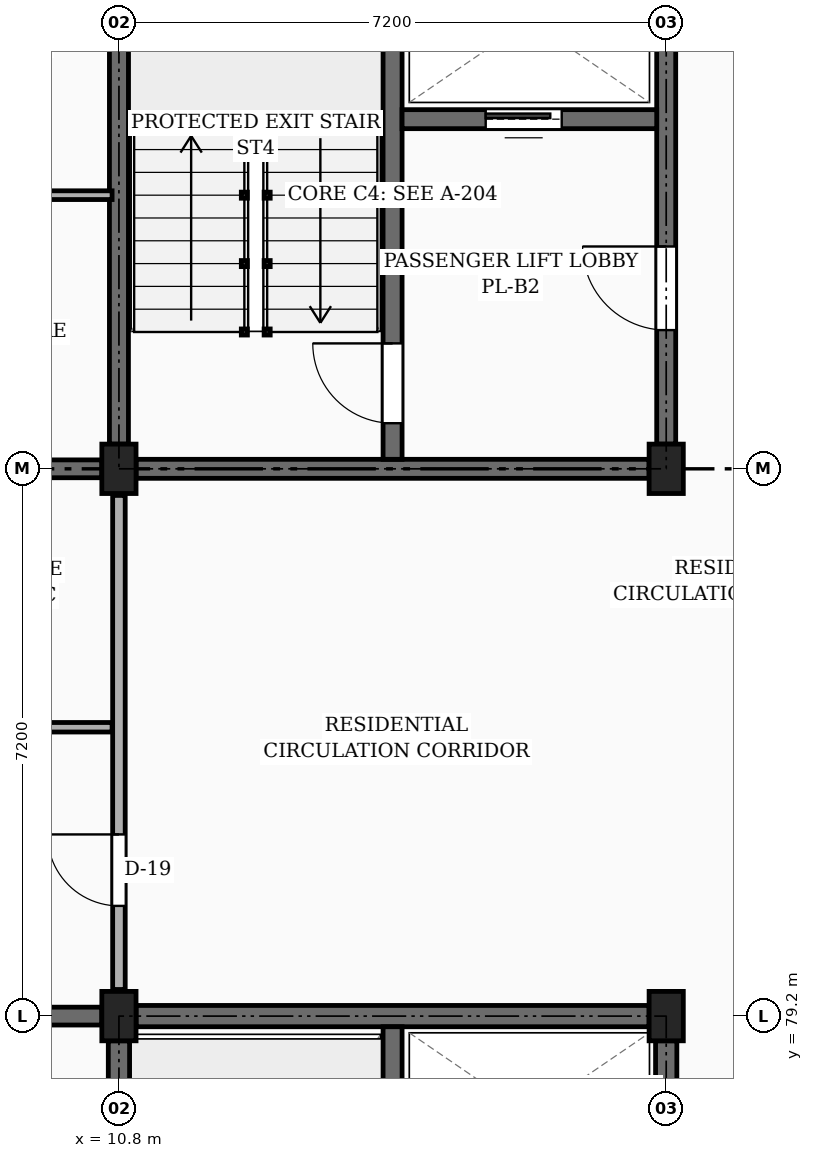
"""IFC4 building model, lengths in metres.
Left out: names, types, materials, properties, quantities, classifications, styles, units other than length and angle.
Written with IfcOpenShell. Run it as: python <this file> out.ifc"""

import sys

from ifc_helpers import new_model, si_unit, direction, frame, frame_2d, origin, origin_2d, place, context, subcontext, project, spatial, rectangle, extrude, element, fill, save


model = new_model("IFC4")
c1 = context("Model", 3, precision=1e-05, world=origin(), true_north=direction((0.0, 1.0)))
c2 = subcontext(c1, "Body", "Model", "MODEL_VIEW")
j1 = project(units=[si_unit("LENGTHUNIT", "METRE"), si_unit("PLANEANGLEUNIT", "RADIAN")], contexts=[c1])
p1 = place(None, origin())
s1 = spatial("IfcSite", under=j1, at=p1, CompositionType="ELEMENT")
p2 = place(p1, origin())
s2 = spatial("IfcBuilding", under=s1, at=p2, CompositionType="ELEMENT")
p3 = place(p2, frame((0.0, 0.0, 17.1)))
s3 = spatial("IfcBuildingStorey", under=s2, at=p3, CompositionType="ELEMENT", Elevation=17.1)
for number, where, z_axis, x_axis in (
    (1, (10.8, 79.2, 0.0), (0.0, 0.0, 1.0), (1.0, 0.0, 0.0)),
    (2, (10.8, 86.4, 0.0), (0.0, 0.0, 1.0), (1.0, 0.0, 0.0)),
    (3, (18.0, 79.2, 0.0), (0.0, 0.0, 1.0), (1.0, 0.0, 0.0)),
    (4, (18.0, 86.4, 0.0), (0.0, 0.0, 1.0), (1.0, 0.0, 0.0)),
):
    element("IfcColumn", number, at=place(p3, frame(where, z_axis=z_axis, x_axis=x_axis)), inside=s3, PredefinedType="COLUMN", context=c2, shape_type="SweptSolid", body=[
        extrude(rectangle(XDim=0.45, YDim=0.65, at=origin_2d()), origin(), (0.0, 0.0, 1.0), 3.15),
    ])
p4 = place(p3, frame((3.875, 79.2, 0.0), z_axis=(0.0, 0.0, 1.0), x_axis=(1.0, 0.0, 0.0)))
e5 = element("IfcWall", 5, at=p4, inside=s3, PredefinedType="SOLIDWALL", context=c2, shape_type="SweptSolid", body=[
    extrude(rectangle(XDim=6.7, YDim=0.235, at=frame_2d((3.35, 0.0))), origin(), (0.0, 0.0, 1.0), 2.21),
])
p5 = place(p3, frame((3.875, 86.4, 0.0), z_axis=(0.0, 0.0, 1.0), x_axis=(1.0, 0.0, 0.0)))
e6 = element("IfcWall", 6, at=p5, inside=s3, PredefinedType="SOLIDWALL", context=c2, shape_type="SweptSolid", body=[
    extrude(rectangle(XDim=6.7, YDim=0.235, at=frame_2d((3.35, 0.0))), origin(), (0.0, 0.0, 1.0), 2.21),
])
p6 = place(p5, frame((1.35, 0.0, 0.0)))
e7 = element("IfcOpeningElement", 7, at=p6, cuts=e6, PredefinedType="OPENING", context=c2, shape_type="SweptSolid", body=[
    extrude(rectangle(XDim=0.98, YDim=2.12, at=frame_2d((0.49, 1.06))), frame((0.0, 0.127, 0.0), z_axis=(0.0, -1.0, 0.0), x_axis=(1.0, 0.0, 0.0)), (0.0, 0.0, 1.0), 0.255),
])
p7 = place(p3, frame((10.8, 72.325, 0.0), z_axis=(0.0, 0.0, 1.0), x_axis=(0.0, 1.0, 0.0)))
e8 = element("IfcWall", 8, at=p7, inside=s3, PredefinedType="SHEAR", context=c2, shape_type="SweptSolid", body=[
    extrude(rectangle(XDim=6.55, YDim=0.28, at=frame_2d((3.275, 0.0))), origin(), (0.0, 0.0, 1.0), 2.91),
])
p8 = place(p3, frame((11.025, 79.2, 0.0), z_axis=(0.0, 0.0, 1.0), x_axis=(1.0, 0.0, 0.0)))
e9 = element("IfcWall", 9, at=p8, inside=s3, PredefinedType="SHEAR", context=c2, shape_type="SweptSolid", body=[
    extrude(rectangle(XDim=6.75, YDim=0.28, at=frame_2d((3.375, 0.0))), origin(), (0.0, 0.0, 1.0), 2.91),
])
p9 = place(p3, frame((18.0, 72.325, 0.0), z_axis=(0.0, 0.0, 1.0), x_axis=(0.0, 1.0, 0.0)))
e10 = element("IfcWall", 10, at=p9, inside=s3, PredefinedType="SHEAR", context=c2, shape_type="SweptSolid", body=[
    extrude(rectangle(XDim=6.55, YDim=0.28, at=frame_2d((3.275, 0.0))), origin(), (0.0, 0.0, 1.0), 2.91),
])
p10 = place(p9, frame((1.5, 0.0, 0.0)))
e11 = element("IfcOpeningElement", 11, at=p10, cuts=e10, PredefinedType="OPENING", context=c2, shape_type="SweptSolid", body=[
    extrude(rectangle(XDim=1.1, YDim=2.15, at=frame_2d((0.55, 1.075))), frame((0.0, 0.15, 0.0), z_axis=(0.0, -1.0, 0.0), x_axis=(1.0, 0.0, 0.0)), (0.0, 0.0, 1.0), 0.3),
])
p11 = place(p3, frame((14.4, 72.14, 0.0), z_axis=(0.0, 0.0, 1.0), x_axis=(0.0, 1.0, 0.0)))
e12 = element("IfcWall", 12, at=p11, inside=s3, PredefinedType="SHEAR", context=c2, shape_type="SweptSolid", body=[
    extrude(rectangle(XDim=6.92, YDim=0.25, at=frame_2d((3.46, 0.0))), origin(), (0.0, 0.0, 1.0), 2.91),
])
p12 = place(p11, frame((0.46, 0.0, 0.0)))
e13 = element("IfcOpeningElement", 13, at=p12, cuts=e12, PredefinedType="OPENING", context=c2, shape_type="SweptSolid", body=[
    extrude(rectangle(XDim=1.05, YDim=2.15, at=frame_2d((0.525, 1.075))), frame((0.0, 0.135, 0.0), z_axis=(0.0, -1.0, 0.0), x_axis=(1.0, 0.0, 0.0)), (0.0, 0.0, 1.0), 0.27),
])
p13 = place(p3, frame((10.8, 86.725, 0.0), z_axis=(0.0, 0.0, 1.0), x_axis=(0.0, 1.0, 0.0)))
e14 = element("IfcWall", 14, at=p13, inside=s3, PredefinedType="SHEAR", context=c2, shape_type="SweptSolid", body=[
    extrude(rectangle(XDim=6.55, YDim=0.25, at=frame_2d((3.275, 0.0))), origin(), (0.0, 0.0, 1.0), 2.91),
])
p14 = place(p3, frame((18.0, 86.725, 0.0), z_axis=(0.0, 0.0, 1.0), x_axis=(0.0, 1.0, 0.0)))
e15 = element("IfcWall", 15, at=p14, inside=s3, PredefinedType="SHEAR", context=c2, shape_type="SweptSolid", body=[
    extrude(rectangle(XDim=6.55, YDim=0.25, at=frame_2d((3.275, 0.0))), origin(), (0.0, 0.0, 1.0), 2.91),
])
p15 = place(p14, frame((1.5, 0.0, 0.0)))
e16 = element("IfcOpeningElement", 16, at=p15, cuts=e15, PredefinedType="OPENING", context=c2, shape_type="SweptSolid", body=[
    extrude(rectangle(XDim=1.1, YDim=2.15, at=frame_2d((0.55, 1.075))), frame((0.0, 0.135, 0.0), z_axis=(0.0, -1.0, 0.0), x_axis=(1.0, 0.0, 0.0)), (0.0, 0.0, 1.0), 0.27),
])
p16 = place(p3, frame((11.025, 86.4, 0.0), z_axis=(0.0, 0.0, 1.0), x_axis=(1.0, 0.0, 0.0)))
e17 = element("IfcWall", 17, at=p16, inside=s3, PredefinedType="SHEAR", context=c2, shape_type="SweptSolid", body=[
    extrude(rectangle(XDim=6.75, YDim=0.25, at=frame_2d((3.375, 0.0))), origin(), (0.0, 0.0, 1.0), 2.91),
])
p17 = place(p3, frame((14.4, 86.525, 0.0), z_axis=(0.0, 0.0, 1.0), x_axis=(0.0, 1.0, 0.0)))
e18 = element("IfcWall", 18, at=p17, inside=s3, PredefinedType="SHEAR", context=c2, shape_type="SweptSolid", body=[
    extrude(rectangle(XDim=6.95, YDim=0.25, at=frame_2d((3.475, 0.0))), origin(), (0.0, 0.0, 1.0), 2.91),
])
p18 = place(p17, frame((0.475, 0.0, 0.0)))
e19 = element("IfcOpeningElement", 19, at=p18, cuts=e18, PredefinedType="OPENING", context=c2, shape_type="SweptSolid", body=[
    extrude(rectangle(XDim=1.05, YDim=2.15, at=frame_2d((0.525, 1.075))), frame((0.0, 0.135, 0.0), z_axis=(0.0, -1.0, 0.0), x_axis=(1.0, 0.0, 0.0)), (0.0, 0.0, 1.0), 0.27),
])
p19 = place(p3, frame((14.525, 91.0, 0.0), z_axis=(0.0, 0.0, 1.0), x_axis=(1.0, 0.0, 0.0)))
e20 = element("IfcWall", 20, at=p19, inside=s3, PredefinedType="SHEAR", context=c2, shape_type="SweptSolid", body=[
    extrude(rectangle(XDim=3.35, YDim=0.25, at=frame_2d((1.675, 0.0))), origin(), (0.0, 0.0, 1.0), 2.91),
])
p20 = place(p19, frame((1.1, 0.0, 0.0)))
e21 = element("IfcOpeningElement", 21, at=p20, cuts=e20, PredefinedType="OPENING", context=c2, shape_type="SweptSolid", body=[
    extrude(rectangle(XDim=1.0, YDim=2.2, at=frame_2d((0.5, 1.1))), frame((0.0, 0.135, 0.0), z_axis=(0.0, -1.0, 0.0), x_axis=(1.0, 0.0, 0.0)), (0.0, 0.0, 1.0), 0.27),
])
p21 = place(p3, frame((10.8, 79.55, 0.0), z_axis=(0.0, 0.0, 1.0), x_axis=(0.0, 1.0, 0.0)))
e22 = element("IfcWall", 22, at=p21, inside=s3, PredefinedType="PARTITIONING", context=c2, shape_type="SweptSolid", body=[
    extrude(rectangle(XDim=6.5, YDim=0.165, at=frame_2d((3.25, 0.0))), origin(), (0.0, 0.0, 1.0), 2.345),
])
p22 = place(p21, frame((1.1, 0.0, 0.0)))
e23 = element("IfcOpeningElement", 23, at=p22, cuts=e22, PredefinedType="OPENING", context=c2, shape_type="SweptSolid", body=[
    extrude(rectangle(XDim=0.94, YDim=2.12, at=frame_2d((0.47, 1.06))), frame((0.0, 0.093, 0.0), z_axis=(0.0, -1.0, 0.0), x_axis=(1.0, 0.0, 0.0)), (0.0, 0.0, 1.0), 0.185),
])
p23 = place(p3, frame((3.775, 83.0, 0.0), z_axis=(0.0, 0.0, 1.0), x_axis=(1.0, 0.0, 0.0)))
e24 = element("IfcWall", 24, at=p23, inside=s3, PredefinedType="PARTITIONING", context=c2, shape_type="SweptSolid", body=[
    extrude(rectangle(XDim=6.935, YDim=0.125, at=frame_2d((3.468, 0.0))), origin(), (0.0, 0.0, 1.0), 2.345),
])
p24 = place(p23, frame((4.6, 0.0, 0.0)))
e25 = element("IfcOpeningElement", 25, at=p24, cuts=e24, PredefinedType="OPENING", context=c2, shape_type="SweptSolid", body=[
    extrude(rectangle(XDim=0.87, YDim=2.05, at=frame_2d((0.435, 1.025))), frame((0.0, 0.073, 0.0), z_axis=(0.0, -1.0, 0.0), x_axis=(1.0, 0.0, 0.0)), (0.0, 0.0, 1.0), 0.145),
])
p25 = place(p23, frame((1.2, 0.0, 0.0)))
e26 = element("IfcOpeningElement", 26, at=p25, cuts=e24, PredefinedType="OPENING", context=c2, shape_type="SweptSolid", body=[
    extrude(rectangle(XDim=0.92, YDim=2.1, at=frame_2d((0.46, 1.05))), frame((0.0, 0.073, 0.0), z_axis=(0.0, -1.0, 0.0), x_axis=(1.0, 0.0, 0.0)), (0.0, 0.0, 1.0), 0.145),
])
p26 = place(p3, frame((3.775, 90.0, 0.0), z_axis=(0.0, 0.0, 1.0), x_axis=(1.0, 0.0, 0.0)))
e27 = element("IfcWall", 27, at=p26, inside=s3, PredefinedType="PARTITIONING", context=c2, shape_type="SweptSolid", body=[
    extrude(rectangle(XDim=6.935, YDim=0.115, at=frame_2d((3.468, 0.0))), origin(), (0.0, 0.0, 1.0), 2.345),
])
p27 = place(p26, frame((2.6, 0.0, 0.0)))
e28 = element("IfcOpeningElement", 28, at=p27, cuts=e27, PredefinedType="OPENING", context=c2, shape_type="SweptSolid", body=[
    extrude(rectangle(XDim=0.92, YDim=2.1, at=frame_2d((0.46, 1.05))), frame((0.0, 0.067, 0.0), z_axis=(0.0, -1.0, 0.0), x_axis=(1.0, 0.0, 0.0)), (0.0, 0.0, 1.0), 0.135),
])
p28 = place(p15, frame((1.1, 0.0, 0.0), z_axis=(0.0, 0.0, 1.0), x_axis=(-1.0, 0.0, 0.0)))
e29 = element("IfcDoor", 29, at=p28, inside=s3, OperationType="SINGLE_SWING_RIGHT", PredefinedType="DOOR", context=c2, shape_type="SweptSolid", body=[
    extrude(rectangle(XDim=1.1, YDim=2.15, at=frame_2d((0.55, 1.075))), frame((0.0, 0.025, 0.0), z_axis=(0.0, -1.0, 0.0), x_axis=(1.0, 0.0, 0.0)), (0.0, 0.0, 1.0), 0.05),
])
fill(e16, e29)
p29 = place(p18, origin())
e30 = element("IfcDoor", 30, at=p29, inside=s3, OperationType="SINGLE_SWING_RIGHT", PredefinedType="DOOR", context=c2, shape_type="SweptSolid", body=[
    extrude(rectangle(XDim=1.05, YDim=2.15, at=frame_2d((0.525, 1.075))), frame((0.0, 0.025, 0.0), z_axis=(0.0, -1.0, 0.0), x_axis=(1.0, 0.0, 0.0)), (0.0, 0.0, 1.0), 0.05),
])
fill(e19, e30)
p30 = place(p20, origin())
e31 = element("IfcDoor", 31, at=p30, inside=s3, OperationType="SLIDING_TO_LEFT", PredefinedType="DOOR", context=c2, shape_type="SweptSolid", body=[
    extrude(rectangle(XDim=1.0, YDim=2.2, at=frame_2d((0.5, 1.1))), frame((0.0, 0.025, 0.0), z_axis=(0.0, -1.0, 0.0), x_axis=(1.0, 0.0, 0.0)), (0.0, 0.0, 1.0), 0.05),
])
fill(e21, e31)
p31 = place(p22, origin())
e32 = element("IfcDoor", 32, at=p31, inside=s3, OperationType="SINGLE_SWING_RIGHT", PredefinedType="DOOR", context=c2, shape_type="SweptSolid", body=[
    extrude(rectangle(XDim=0.94, YDim=2.12, at=frame_2d((0.47, 1.06))), frame((0.0, 0.025, 0.0), z_axis=(0.0, -1.0, 0.0), x_axis=(1.0, 0.0, 0.0)), (0.0, 0.0, 1.0), 0.05),
])
fill(e23, e32)
save(model, sys.argv[1])
